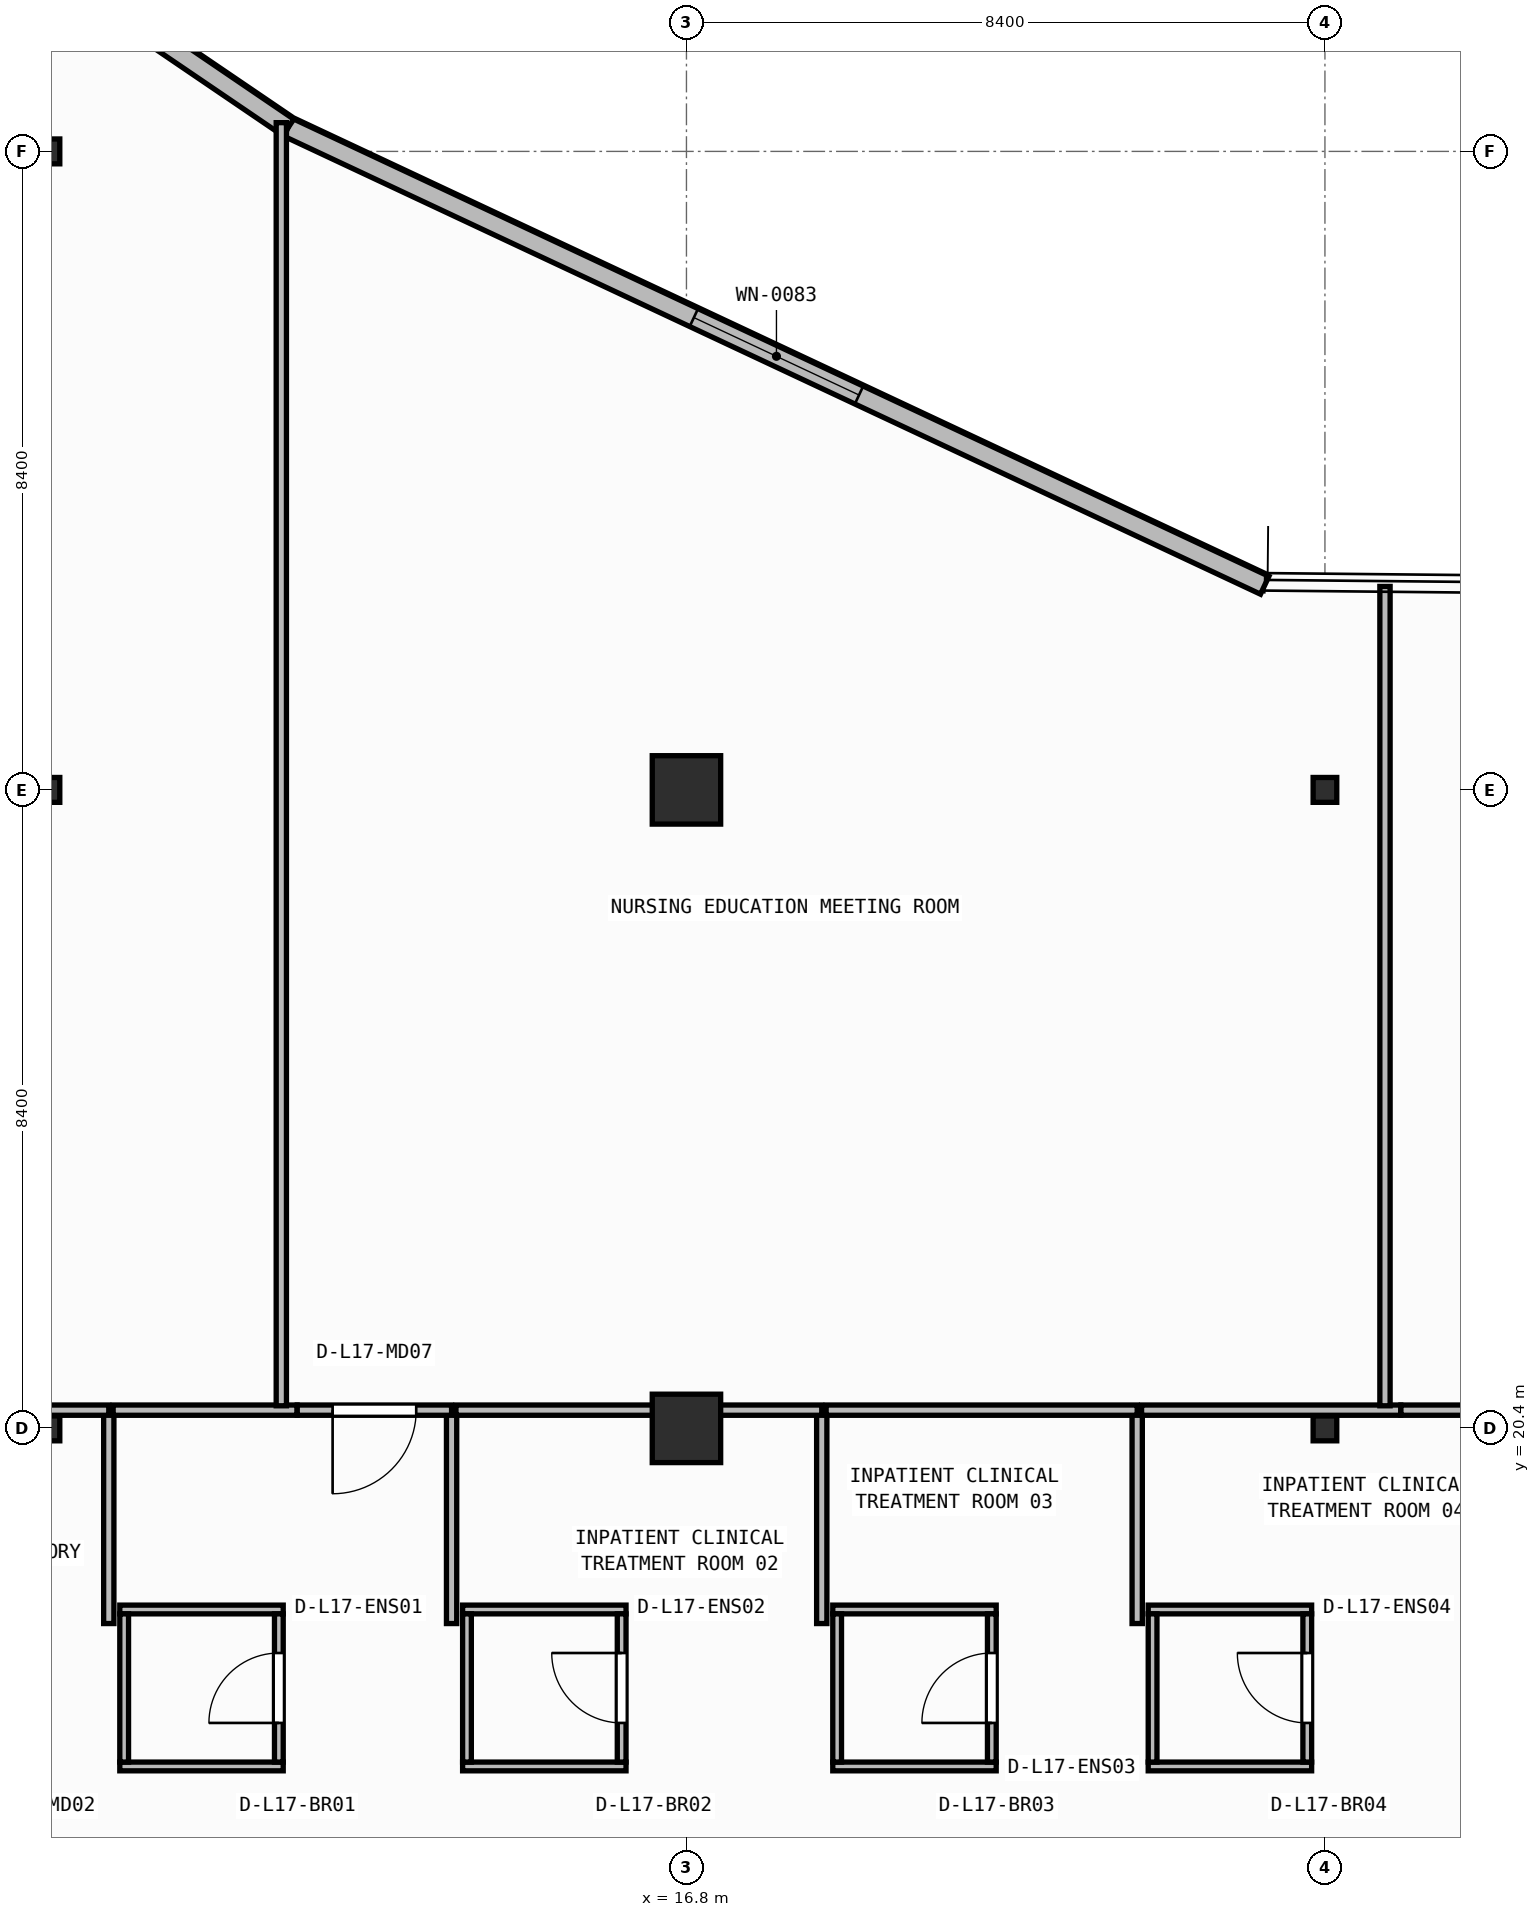
"""IFC4 building model, lengths in metres.
Left out: names, types, materials, properties, quantities, classifications, styles, units other than length and angle.
Written with IfcOpenShell. Run it as: python <this file> out.ifc"""

import sys

from ifc_helpers import new_model, si_unit, direction, frame, frame_2d, origin, origin_2d, place, context, subcontext, project, spatial, rectangle, i_section, extrude, element, fill, save


model = new_model("IFC4")
c1 = context("Model", 3, precision=1e-05, world=origin(), true_north=direction((0.0, 1.0)))
c2 = subcontext(c1, "Body", "Model", "MODEL_VIEW")
j1 = project(units=[si_unit("LENGTHUNIT", "METRE"), si_unit("PLANEANGLEUNIT", "RADIAN")], contexts=[c1])
p1 = place(None, origin())
s1 = spatial("IfcSite", under=j1, at=p1, CompositionType="ELEMENT")
p2 = place(p1, origin())
s2 = spatial("IfcBuilding", under=s1, at=p2, CompositionType="ELEMENT")
p3 = place(p2, frame((0.0, 0.0, 69.9)))
s3 = spatial("IfcBuildingStorey", under=s2, at=p3, CompositionType="ELEMENT", Elevation=69.9)
p4 = place(p3, frame((8.4, 20.4, 0.0), z_axis=(0.0, 0.0, 1.0), x_axis=(1.0, 0.0, 0.0)))
e1 = element("IfcColumn", 1, at=p4, inside=s3, PredefinedType="COLUMN", context=c2, shape_type="SweptSolid", body=[
    extrude(i_section(OverallWidth=0.311, OverallDepth=0.327, WebThickness=0.016, FlangeThickness=0.025, FilletRadius=0.017, at=origin_2d()), origin(), (0.0, 0.0, 1.0), 3.95),
])
p5 = place(p3, frame((16.8, 20.4, 0.0), z_axis=(0.0, 0.0, 1.0), x_axis=(1.0, 0.0, 0.0)))
e2 = element("IfcColumn", 2, at=p5, inside=s3, PredefinedType="COLUMN", context=c2, shape_type="SweptSolid", body=[
    extrude(rectangle(XDim=0.9, YDim=0.9, at=origin_2d()), origin(), (0.0, 0.0, 1.0), 3.95),
])
for number, where, z_axis, x_axis in (
    (3, (25.2, 20.4, 0.0), (0.0, 0.0, 1.0), (1.0, 0.0, 0.0)),
    (4, (8.4, 28.8, 0.0), (0.0, 0.0, 1.0), (1.0, 0.0, 0.0)),
):
    element("IfcColumn", number, at=place(p3, frame(where, z_axis=z_axis, x_axis=x_axis)), inside=s3, PredefinedType="COLUMN", context=c2, shape_type="SweptSolid", body=[
        extrude(i_section(OverallWidth=0.311, OverallDepth=0.327, WebThickness=0.016, FlangeThickness=0.025, FilletRadius=0.017, at=origin_2d()), origin(), (0.0, 0.0, 1.0), 3.95),
    ])
p6 = place(p3, frame((16.8, 28.8, 0.0), z_axis=(0.0, 0.0, 1.0), x_axis=(1.0, 0.0, 0.0)))
e5 = element("IfcColumn", 5, at=p6, inside=s3, PredefinedType="COLUMN", context=c2, shape_type="SweptSolid", body=[
    extrude(rectangle(XDim=0.9, YDim=0.9, at=origin_2d()), origin(), (0.0, 0.0, 1.0), 3.95),
])
for number, where, z_axis, x_axis in (
    (6, (25.2, 28.8, 0.0), (0.0, 0.0, 1.0), (1.0, 0.0, 0.0)),
    (7, (8.4, 37.2, 0.0), (0.0, 0.0, 1.0), (1.0, 0.0, 0.0)),
):
    element("IfcColumn", number, at=place(p3, frame(where, z_axis=z_axis, x_axis=x_axis)), inside=s3, PredefinedType="COLUMN", context=c2, shape_type="SweptSolid", body=[
        extrude(i_section(OverallWidth=0.311, OverallDepth=0.327, WebThickness=0.016, FlangeThickness=0.025, FilletRadius=0.017, at=origin_2d()), origin(), (0.0, 0.0, 1.0), 3.95),
    ])
p7 = place(p3, frame((24.408, 31.492, 0.0), z_axis=(0.0, 0.0, 1.0), x_axis=(-0.905396522918, 0.424566998585, 0.0)))
e8 = element("IfcWall", 8, at=p7, inside=s3, PredefinedType="STANDARD", context=c2, shape_type="SweptSolid", body=[
    extrude(rectangle(XDim=14.189, YDim=0.26, at=frame_2d((7.095, 0.0))), origin(), (0.0, 0.0, 1.0), 3.71),
])
p8 = place(p7, frame((5.895, 0.0, 0.9)))
e9 = element("IfcOpeningElement", 9, at=p8, cuts=e8, PredefinedType="OPENING", context=c2, shape_type="SweptSolid", body=[
    extrude(rectangle(XDim=2.4, YDim=1.65, at=frame_2d((1.2, 0.825))), frame((0.0, 0.14, 0.0), z_axis=(0.0, -1.0, 0.0), x_axis=(1.0, 0.0, 0.0)), (0.0, 0.0, 1.0), 0.28),
])
p9 = place(p3, frame((11.561, 37.517, 0.0), z_axis=(0.0, 0.0, 1.0), x_axis=(-0.827064743936, 0.562106670782, 0.0)))
e10 = element("IfcWall", 10, at=p9, inside=s3, PredefinedType="STANDARD", context=c2, shape_type="SweptSolid", body=[
    extrude(rectangle(XDim=10.641, YDim=0.26, at=frame_2d((5.32, 0.0))), origin(), (0.0, 0.0, 1.0), 3.71),
])
p10 = place(p9, frame((4.12, 0.0, 0.9)))
e11 = element("IfcOpeningElement", 11, at=p10, cuts=e10, PredefinedType="OPENING", context=c2, shape_type="SweptSolid", body=[
    extrude(rectangle(XDim=2.4, YDim=1.65, at=frame_2d((1.2, 0.825))), frame((0.0, 0.14, 0.0), z_axis=(0.0, -1.0, 0.0), x_axis=(1.0, 0.0, 0.0)), (0.0, 0.0, 1.0), 0.28),
])
for number, where, z_axis, x_axis in (
    (12, (9.345, 15.952, 0.0), (0.0, 0.0, 1.0), (1.0, 0.0, 0.0)),
    (13, (9.345, 18.018, 0.0), (0.0, 0.0, 1.0), (1.0, 0.0, 0.0)),
):
    element("IfcWall", number, at=place(p3, frame(where, z_axis=z_axis, x_axis=x_axis)), inside=s3, PredefinedType="PARTITIONING", context=c2, shape_type="SweptSolid", body=[
        extrude(rectangle(XDim=2.15, YDim=0.115, at=frame_2d((1.075, 0.0))), origin(), (0.0, 0.0, 1.0), 3.71),
    ])
p11 = place(p3, frame((9.403, 16.01, 0.0), z_axis=(0.0, 0.0, 1.0), x_axis=(0.0, 1.0, 0.0)))
e14 = element("IfcWall", 14, at=p11, inside=s3, PredefinedType="PARTITIONING", context=c2, shape_type="SweptSolid", body=[
    extrude(rectangle(XDim=1.95, YDim=0.115, at=frame_2d((0.975, 0.0))), origin(), (0.0, 0.0, 1.0), 3.71),
])
p12 = place(p3, frame((11.438, 16.01, 0.0), z_axis=(0.0, 0.0, 1.0), x_axis=(0.0, 1.0, 0.0)))
e15 = element("IfcWall", 15, at=p12, inside=s3, PredefinedType="PARTITIONING", context=c2, shape_type="SweptSolid", body=[
    extrude(rectangle(XDim=1.95, YDim=0.115, at=frame_2d((0.975, 0.0))), origin(), (0.0, 0.0, 1.0), 3.71),
])
p13 = place(p12, frame((0.515, 0.0, 0.0)))
e16 = element("IfcOpeningElement", 16, at=p13, cuts=e15, PredefinedType="OPENING", context=c2, shape_type="SweptSolid", body=[
    extrude(rectangle(XDim=0.92, YDim=2.1, at=frame_2d((0.46, 1.05))), frame((0.0, 0.067, 0.0), z_axis=(0.0, -1.0, 0.0), x_axis=(1.0, 0.0, 0.0)), (0.0, 0.0, 1.0), 0.135),
])
for number, where, z_axis, x_axis in (
    (17, (13.855, 15.952, 0.0), (0.0, 0.0, 1.0), (1.0, 0.0, 0.0)),
    (18, (13.855, 18.018, 0.0), (0.0, 0.0, 1.0), (1.0, 0.0, 0.0)),
):
    element("IfcWall", number, at=place(p3, frame(where, z_axis=z_axis, x_axis=x_axis)), inside=s3, PredefinedType="PARTITIONING", context=c2, shape_type="SweptSolid", body=[
        extrude(rectangle(XDim=2.15, YDim=0.115, at=frame_2d((1.075, 0.0))), origin(), (0.0, 0.0, 1.0), 3.71),
    ])
p14 = place(p3, frame((13.913, 16.01, 0.0), z_axis=(0.0, 0.0, 1.0), x_axis=(0.0, 1.0, 0.0)))
e19 = element("IfcWall", 19, at=p14, inside=s3, PredefinedType="PARTITIONING", context=c2, shape_type="SweptSolid", body=[
    extrude(rectangle(XDim=1.95, YDim=0.115, at=frame_2d((0.975, 0.0))), origin(), (0.0, 0.0, 1.0), 3.71),
])
p15 = place(p3, frame((15.948, 16.01, 0.0), z_axis=(0.0, 0.0, 1.0), x_axis=(0.0, 1.0, 0.0)))
e20 = element("IfcWall", 20, at=p15, inside=s3, PredefinedType="PARTITIONING", context=c2, shape_type="SweptSolid", body=[
    extrude(rectangle(XDim=1.95, YDim=0.115, at=frame_2d((0.975, 0.0))), origin(), (0.0, 0.0, 1.0), 3.71),
])
p16 = place(p15, frame((0.515, 0.0, 0.0)))
e21 = element("IfcOpeningElement", 21, at=p16, cuts=e20, PredefinedType="OPENING", context=c2, shape_type="SweptSolid", body=[
    extrude(rectangle(XDim=0.92, YDim=2.1, at=frame_2d((0.46, 1.05))), frame((0.0, 0.067, 0.0), z_axis=(0.0, -1.0, 0.0), x_axis=(1.0, 0.0, 0.0)), (0.0, 0.0, 1.0), 0.135),
])
for number, where, z_axis, x_axis in (
    (22, (18.725, 15.952, 0.0), (0.0, 0.0, 1.0), (1.0, 0.0, 0.0)),
    (23, (18.725, 18.018, 0.0), (0.0, 0.0, 1.0), (1.0, 0.0, 0.0)),
):
    element("IfcWall", number, at=place(p3, frame(where, z_axis=z_axis, x_axis=x_axis)), inside=s3, PredefinedType="PARTITIONING", context=c2, shape_type="SweptSolid", body=[
        extrude(rectangle(XDim=2.15, YDim=0.115, at=frame_2d((1.075, 0.0))), origin(), (0.0, 0.0, 1.0), 3.71),
    ])
p17 = place(p3, frame((18.782, 16.01, 0.0), z_axis=(0.0, 0.0, 1.0), x_axis=(0.0, 1.0, 0.0)))
e24 = element("IfcWall", 24, at=p17, inside=s3, PredefinedType="PARTITIONING", context=c2, shape_type="SweptSolid", body=[
    extrude(rectangle(XDim=1.95, YDim=0.115, at=frame_2d((0.975, 0.0))), origin(), (0.0, 0.0, 1.0), 3.71),
])
p18 = place(p3, frame((20.817, 16.01, 0.0), z_axis=(0.0, 0.0, 1.0), x_axis=(0.0, 1.0, 0.0)))
e25 = element("IfcWall", 25, at=p18, inside=s3, PredefinedType="PARTITIONING", context=c2, shape_type="SweptSolid", body=[
    extrude(rectangle(XDim=1.95, YDim=0.115, at=frame_2d((0.975, 0.0))), origin(), (0.0, 0.0, 1.0), 3.71),
])
p19 = place(p18, frame((0.515, 0.0, 0.0)))
e26 = element("IfcOpeningElement", 26, at=p19, cuts=e25, PredefinedType="OPENING", context=c2, shape_type="SweptSolid", body=[
    extrude(rectangle(XDim=0.92, YDim=2.1, at=frame_2d((0.46, 1.05))), frame((0.0, 0.067, 0.0), z_axis=(0.0, -1.0, 0.0), x_axis=(1.0, 0.0, 0.0)), (0.0, 0.0, 1.0), 0.135),
])
for number, where, z_axis, x_axis in (
    (27, (22.875, 15.952, 0.0), (0.0, 0.0, 1.0), (1.0, 0.0, 0.0)),
    (28, (22.875, 18.018, 0.0), (0.0, 0.0, 1.0), (1.0, 0.0, 0.0)),
):
    element("IfcWall", number, at=place(p3, frame(where, z_axis=z_axis, x_axis=x_axis)), inside=s3, PredefinedType="PARTITIONING", context=c2, shape_type="SweptSolid", body=[
        extrude(rectangle(XDim=2.15, YDim=0.115, at=frame_2d((1.075, 0.0))), origin(), (0.0, 0.0, 1.0), 3.71),
    ])
p20 = place(p3, frame((22.933, 16.01, 0.0), z_axis=(0.0, 0.0, 1.0), x_axis=(0.0, 1.0, 0.0)))
e29 = element("IfcWall", 29, at=p20, inside=s3, PredefinedType="PARTITIONING", context=c2, shape_type="SweptSolid", body=[
    extrude(rectangle(XDim=1.95, YDim=0.115, at=frame_2d((0.975, 0.0))), origin(), (0.0, 0.0, 1.0), 3.71),
])
p21 = place(p3, frame((24.968, 16.01, 0.0), z_axis=(0.0, 0.0, 1.0), x_axis=(0.0, 1.0, 0.0)))
e30 = element("IfcWall", 30, at=p21, inside=s3, PredefinedType="PARTITIONING", context=c2, shape_type="SweptSolid", body=[
    extrude(rectangle(XDim=1.95, YDim=0.115, at=frame_2d((0.975, 0.0))), origin(), (0.0, 0.0, 1.0), 3.073),
])
p22 = place(p21, frame((0.515, 0.0, 0.0)))
e31 = element("IfcOpeningElement", 31, at=p22, cuts=e30, PredefinedType="OPENING", context=c2, shape_type="SweptSolid", body=[
    extrude(rectangle(XDim=0.92, YDim=2.1, at=frame_2d((0.46, 1.05))), frame((0.0, 0.067, 0.0), z_axis=(0.0, -1.0, 0.0), x_axis=(1.0, 0.0, 0.0)), (0.0, 0.0, 1.0), 0.135),
])
p23 = place(p3, frame((9.2, 17.833, 0.0), z_axis=(0.0, 0.0, 1.0), x_axis=(0.0, 1.0, 0.0)))
e32 = element("IfcWall", 32, at=p23, inside=s3, PredefinedType="PARTITIONING", context=c2, shape_type="SweptSolid", body=[
    extrude(rectangle(XDim=2.807, YDim=0.135, at=frame_2d((1.404, 0.0))), origin(), (0.0, 0.0, 1.0), 3.71),
])
p24 = place(p3, frame((9.2, 20.64, 0.0), z_axis=(0.0, 0.0, 1.0), x_axis=(-1.0, 0.0, 0.0)))
e33 = element("IfcWall", 33, at=p24, inside=s3, PredefinedType="PARTITIONING", context=c2, shape_type="SweptSolid", body=[
    extrude(rectangle(XDim=4.093, YDim=0.135, at=frame_2d((2.046, 0.0))), origin(), (0.0, 0.0, 1.0), 3.073),
])
p25 = place(p3, frame((13.71, 17.833, 0.0), z_axis=(0.0, 0.0, 1.0), x_axis=(0.0, 1.0, 0.0)))
e34 = element("IfcWall", 34, at=p25, inside=s3, PredefinedType="PARTITIONING", context=c2, shape_type="SweptSolid", body=[
    extrude(rectangle(XDim=2.807, YDim=0.135, at=frame_2d((1.404, 0.0))), origin(), (0.0, 0.0, 1.0), 3.71),
])
p26 = place(p3, frame((11.677, 20.64, 0.0), z_axis=(0.0, 0.0, 1.0), x_axis=(-1.0, 0.0, 0.0)))
e35 = element("IfcWall", 35, at=p26, inside=s3, PredefinedType="PARTITIONING", context=c2, shape_type="SweptSolid", body=[
    extrude(rectangle(XDim=2.42, YDim=0.135, at=frame_2d((1.21, 0.0))), origin(), (0.0, 0.0, 1.0), 3.073),
])
p27 = place(p3, frame((13.71, 20.64, 0.0), z_axis=(0.0, 0.0, 1.0), x_axis=(-1.0, 0.0, 0.0)))
e36 = element("IfcWall", 36, at=p27, inside=s3, PredefinedType="PARTITIONING", context=c2, shape_type="SweptSolid", body=[
    extrude(rectangle(XDim=2.031, YDim=0.135, at=frame_2d((1.015, 0.0))), origin(), (0.0, 0.0, 1.0), 3.073),
])
p28 = place(p27, frame((0.465, 0.0, 0.0)))
e37 = element("IfcOpeningElement", 37, at=p28, cuts=e36, PredefinedType="OPENING", context=c2, shape_type="SweptSolid", body=[
    extrude(rectangle(XDim=1.1, YDim=2.1, at=frame_2d((0.55, 1.05))), frame((0.0, 0.077, 0.0), z_axis=(0.0, -1.0, 0.0), x_axis=(1.0, 0.0, 0.0)), (0.0, 0.0, 1.0), 0.155),
])
p29 = place(p3, frame((18.58, 17.833, 0.0), z_axis=(0.0, 0.0, 1.0), x_axis=(0.0, 1.0, 0.0)))
e38 = element("IfcWall", 38, at=p29, inside=s3, PredefinedType="PARTITIONING", context=c2, shape_type="SweptSolid", body=[
    extrude(rectangle(XDim=2.807, YDim=0.135, at=frame_2d((1.404, 0.0))), origin(), (0.0, 0.0, 1.0), 3.71),
])
p30 = place(p3, frame((18.58, 20.64, 0.0), z_axis=(0.0, 0.0, 1.0), x_axis=(-1.0, 0.0, 0.0)))
e39 = element("IfcWall", 39, at=p30, inside=s3, PredefinedType="PARTITIONING", context=c2, shape_type="SweptSolid", body=[
    extrude(rectangle(XDim=4.812, YDim=0.135, at=frame_2d((2.406, 0.0))), origin(), (0.0, 0.0, 1.0), 3.073),
])
p31 = place(p3, frame((22.73, 17.833, 0.0), z_axis=(0.0, 0.0, 1.0), x_axis=(0.0, 1.0, 0.0)))
e40 = element("IfcWall", 40, at=p31, inside=s3, PredefinedType="PARTITIONING", context=c2, shape_type="SweptSolid", body=[
    extrude(rectangle(XDim=2.807, YDim=0.135, at=frame_2d((1.404, 0.0))), origin(), (0.0, 0.0, 1.0), 3.71),
])
p32 = place(p3, frame((22.73, 20.64, 0.0), z_axis=(0.0, 0.0, 1.0), x_axis=(-1.0, 0.0, 0.0)))
e41 = element("IfcWall", 41, at=p32, inside=s3, PredefinedType="PARTITIONING", context=c2, shape_type="SweptSolid", body=[
    extrude(rectangle(XDim=4.093, YDim=0.135, at=frame_2d((2.046, 0.0))), origin(), (0.0, 0.0, 1.0), 3.073),
])
p33 = place(p3, frame((26.198, 20.64, 0.0), z_axis=(0.0, 0.0, 1.0), x_axis=(-1.0, 0.0, 0.0)))
e42 = element("IfcWall", 42, at=p33, inside=s3, PredefinedType="PARTITIONING", context=c2, shape_type="SweptSolid", body=[
    extrude(rectangle(XDim=3.41, YDim=0.135, at=frame_2d((1.705, 0.0))), origin(), (0.0, 0.0, 1.0), 3.073),
])
p34 = place(p3, frame((27.32, 20.64, 0.0), z_axis=(0.0, 0.0, 1.0), x_axis=(-1.0, 0.0, 0.0)))
e43 = element("IfcWall", 43, at=p34, inside=s3, PredefinedType="PARTITIONING", context=c2, shape_type="SweptSolid", body=[
    extrude(rectangle(XDim=1.121, YDim=0.135, at=frame_2d((0.56, 0.0))), origin(), (0.0, 0.0, 1.0), 3.073),
])
p35 = place(p3, frame((11.47, 20.698, 0.0), z_axis=(0.0, 0.0, 1.0), x_axis=(0.0, 1.0, 0.0)))
e44 = element("IfcWall", 44, at=p35, inside=s3, PredefinedType="PARTITIONING", context=c2, shape_type="SweptSolid", body=[
    extrude(rectangle(XDim=16.881, YDim=0.135, at=frame_2d((8.44, 0.0))), origin(), (0.0, 0.0, 1.0), 3.71),
])
p36 = place(p3, frame((25.99, 20.698, 0.0), z_axis=(0.0, 0.0, 1.0), x_axis=(0.0, 1.0, 0.0)))
e45 = element("IfcWall", 45, at=p36, inside=s3, PredefinedType="PARTITIONING", context=c2, shape_type="SweptSolid", body=[
    extrude(rectangle(XDim=10.779, YDim=0.135, at=frame_2d((5.39, 0.0))), origin(), (0.0, 0.0, 1.0), 3.71),
])
p37 = place(p8, origin())
e46 = element("IfcWindow", 46, at=p37, inside=s3, PartitioningType="SINGLE_PANEL", PredefinedType="WINDOW", context=c2, shape_type="SweptSolid", body=[
    extrude(rectangle(XDim=2.4, YDim=1.65, at=frame_2d((1.2, 0.825))), frame((0.0, 0.03, 0.0), z_axis=(0.0, -1.0, 0.0), x_axis=(1.0, 0.0, 0.0)), (0.0, 0.0, 1.0), 0.06),
])
fill(e9, e46)
p38 = place(p13, origin())
e47 = element("IfcDoor", 47, at=p38, inside=s3, OperationType="SINGLE_SWING_LEFT", PredefinedType="DOOR", context=c2, shape_type="SweptSolid", body=[
    extrude(rectangle(XDim=0.92, YDim=2.1, at=frame_2d((0.46, 1.05))), frame((0.0, 0.025, 0.0), z_axis=(0.0, -1.0, 0.0), x_axis=(1.0, 0.0, 0.0)), (0.0, 0.0, 1.0), 0.05),
])
fill(e16, e47)
p39 = place(p16, origin())
e48 = element("IfcDoor", 48, at=p39, inside=s3, OperationType="SINGLE_SWING_RIGHT", PredefinedType="DOOR", context=c2, shape_type="SweptSolid", body=[
    extrude(rectangle(XDim=0.92, YDim=2.1, at=frame_2d((0.46, 1.05))), frame((0.0, 0.025, 0.0), z_axis=(0.0, -1.0, 0.0), x_axis=(1.0, 0.0, 0.0)), (0.0, 0.0, 1.0), 0.05),
])
fill(e21, e48)
p40 = place(p19, origin())
e49 = element("IfcDoor", 49, at=p40, inside=s3, OperationType="SINGLE_SWING_LEFT", PredefinedType="DOOR", context=c2, shape_type="SweptSolid", body=[
    extrude(rectangle(XDim=0.92, YDim=2.1, at=frame_2d((0.46, 1.05))), frame((0.0, 0.025, 0.0), z_axis=(0.0, -1.0, 0.0), x_axis=(1.0, 0.0, 0.0)), (0.0, 0.0, 1.0), 0.05),
])
fill(e26, e49)
p41 = place(p22, origin())
e50 = element("IfcDoor", 50, at=p41, inside=s3, OperationType="SINGLE_SWING_RIGHT", PredefinedType="DOOR", context=c2, shape_type="SweptSolid", body=[
    extrude(rectangle(XDim=0.92, YDim=2.1, at=frame_2d((0.46, 1.05))), frame((0.0, 0.025, 0.0), z_axis=(0.0, -1.0, 0.0), x_axis=(1.0, 0.0, 0.0)), (0.0, 0.0, 1.0), 0.05),
])
fill(e31, e50)
p42 = place(p28, origin())
e51 = element("IfcDoor", 51, at=p42, inside=s3, OperationType="SINGLE_SWING_RIGHT", PredefinedType="DOOR", context=c2, shape_type="SweptSolid", body=[
    extrude(rectangle(XDim=1.1, YDim=2.1, at=frame_2d((0.55, 1.05))), frame((0.0, 0.025, 0.0), z_axis=(0.0, -1.0, 0.0), x_axis=(1.0, 0.0, 0.0)), (0.0, 0.0, 1.0), 0.05),
])
fill(e37, e51)
save(model, sys.argv[1])
